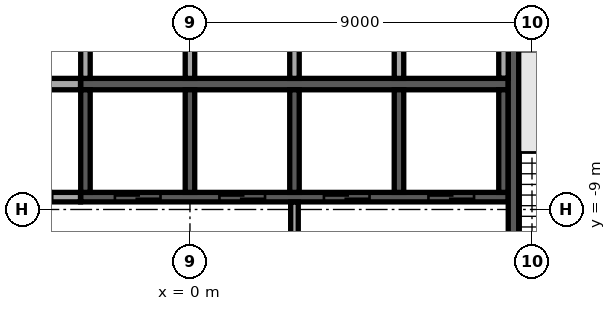
"""IFC4 building model, lengths in metres.
Left out: names, types, materials, properties, quantities, classifications, styles, units other than length and angle.
Written with IfcOpenShell. Run it as: python <this file> out.ifc"""

import sys

from ifc_helpers import new_model, si_unit, direction, frame, frame_2d, origin, place, context, subcontext, project, spatial, rectangle, extrude, element, fill, save


model = new_model("IFC4")
c1 = context("Model", 3, precision=1e-05, world=origin(), true_north=direction((0.0, 1.0)))
c2 = subcontext(c1, "Body", "Model", "MODEL_VIEW")
j1 = project(units=[si_unit("LENGTHUNIT", "METRE"), si_unit("PLANEANGLEUNIT", "RADIAN")], contexts=[c1])
p1 = place(None, origin())
s1 = spatial("IfcSite", under=j1, at=p1, CompositionType="ELEMENT")
p2 = place(p1, origin())
s2 = spatial("IfcBuilding", under=s1, at=p2, CompositionType="ELEMENT")
p3 = place(p2, frame((0.0, 0.0, 225.3)))
s3 = spatial("IfcBuildingStorey", under=s2, at=p3, CompositionType="ELEMENT", Elevation=225.3)
p4 = place(p3, frame((-2.875, -5.7, 0.0), z_axis=(0.0, 0.0, 1.0), x_axis=(1.0, 0.0, 0.0)))
e1 = element("IfcWall", 1, at=p4, inside=s3, PredefinedType="SOLIDWALL", context=c2, shape_type="SweptSolid", body=[
    extrude(rectangle(XDim=11.25, YDim=0.3, at=frame_2d((5.625, 0.0))), origin(), (0.0, 0.0, 1.0), 3.62),
])
for number, where, z_axis, x_axis in (
    (2, (-2.75, -5.55, 0.0), (0.0, 0.0, 1.0), (0.0, 1.0, 0.0)),
    (3, (0.0, -5.55, 0.0), (0.0, 0.0, 1.0), (0.0, 1.0, 0.0)),
    (4, (2.75, -5.55, 0.0), (0.0, 0.0, 1.0), (0.0, 1.0, 0.0)),
    (5, (5.5, -5.55, 0.0), (0.0, 0.0, 1.0), (0.0, 1.0, 0.0)),
):
    element("IfcWall", number, at=place(p3, frame(where, z_axis=z_axis, x_axis=x_axis)), inside=s3, PredefinedType="SOLIDWALL", context=c2, shape_type="SweptSolid", body=[
        extrude(rectangle(XDim=2.7, YDim=0.25, at=frame_2d((1.35, 0.0))), origin(), (0.0, 0.0, 1.0), 3.62),
    ])
p5 = place(p3, frame((-2.875, -8.675, 0.0), z_axis=(0.0, 0.0, 1.0), x_axis=(1.0, 0.0, 0.0)))
e6 = element("IfcWall", 6, at=p5, inside=s3, PredefinedType="SOLIDWALL", context=c2, shape_type="SweptSolid", body=[
    extrude(rectangle(XDim=11.25, YDim=0.25, at=frame_2d((5.625, 0.0))), origin(), (0.0, 0.0, 1.0), 3.62),
])
p6 = place(p5, frame((0.9, 0.0, 0.0)))
e7 = element("IfcOpeningElement", 7, at=p6, cuts=e6, PredefinedType="OPENING", context=c2, shape_type="SweptSolid", body=[
    extrude(rectangle(XDim=1.2, YDim=2.1, at=frame_2d((0.6, 1.05))), frame((0.0, 0.135, 0.0), z_axis=(0.0, -1.0, 0.0), x_axis=(1.0, 0.0, 0.0)), (0.0, 0.0, 1.0), 0.27),
])
p7 = place(p5, frame((3.65, 0.0, 0.0)))
e8 = element("IfcOpeningElement", 8, at=p7, cuts=e6, PredefinedType="OPENING", context=c2, shape_type="SweptSolid", body=[
    extrude(rectangle(XDim=1.2, YDim=2.1, at=frame_2d((0.6, 1.05))), frame((0.0, 0.135, 0.0), z_axis=(0.0, -1.0, 0.0), x_axis=(1.0, 0.0, 0.0)), (0.0, 0.0, 1.0), 0.27),
])
p8 = place(p5, frame((6.4, 0.0, 0.0)))
e9 = element("IfcOpeningElement", 9, at=p8, cuts=e6, PredefinedType="OPENING", context=c2, shape_type="SweptSolid", body=[
    extrude(rectangle(XDim=1.2, YDim=2.1, at=frame_2d((0.6, 1.05))), frame((0.0, 0.135, 0.0), z_axis=(0.0, -1.0, 0.0), x_axis=(1.0, 0.0, 0.0)), (0.0, 0.0, 1.0), 0.27),
])
p9 = place(p5, frame((9.15, 0.0, 0.0)))
e10 = element("IfcOpeningElement", 10, at=p9, cuts=e6, PredefinedType="OPENING", context=c2, shape_type="SweptSolid", body=[
    extrude(rectangle(XDim=1.2, YDim=2.1, at=frame_2d((0.6, 1.05))), frame((0.0, 0.135, 0.0), z_axis=(0.0, -1.0, 0.0), x_axis=(1.0, 0.0, 0.0)), (0.0, 0.0, 1.0), 0.27),
])
for number, where, z_axis, x_axis in (
    (11, (-2.75, -8.55, 0.0), (0.0, 0.0, 1.0), (0.0, 1.0, 0.0)),
    (12, (0.0, -8.55, 0.0), (0.0, 0.0, 1.0), (0.0, 1.0, 0.0)),
    (13, (2.75, -8.55, 0.0), (0.0, 0.0, 1.0), (0.0, 1.0, 0.0)),
    (14, (5.5, -8.55, 0.0), (0.0, 0.0, 1.0), (0.0, 1.0, 0.0)),
    (15, (8.25, -8.55, 0.0), (0.0, 0.0, 1.0), (0.0, 1.0, 0.0)),
):
    element("IfcWall", number, at=place(p3, frame(where, z_axis=z_axis, x_axis=x_axis)), inside=s3, PredefinedType="SOLIDWALL", context=c2, shape_type="SweptSolid", body=[
        extrude(rectangle(XDim=2.7, YDim=0.25, at=frame_2d((1.35, 0.0))), origin(), (0.0, 0.0, 1.0), 3.62),
    ])
p10 = place(p3, frame((8.512, -4.55, 0.0), z_axis=(0.0, 0.0, 1.0), x_axis=(0.0, -1.0, 0.0)))
e16 = element("IfcWall", 16, at=p10, inside=s3, PredefinedType="SOLIDWALL", context=c2, shape_type="SweptSolid", body=[
    extrude(rectangle(XDim=7.25, YDim=0.275, at=frame_2d((3.625, 0.0))), origin(), (0.0, 0.0, 1.0), 3.62),
])
p11 = place(p10, frame((6.0, 0.0, 0.0)))
e17 = element("IfcOpeningElement", 17, at=p11, cuts=e16, PredefinedType="OPENING", context=c2, shape_type="SweptSolid", body=[
    extrude(rectangle(XDim=1.0, YDim=2.1, at=frame_2d((0.5, 1.05))), frame((0.0, 0.147, 0.0), z_axis=(0.0, -1.0, 0.0), x_axis=(1.0, 0.0, 0.0)), (0.0, 0.0, 1.0), 0.295),
])
p12 = place(p3, frame((2.75, -11.795, 0.0), z_axis=(0.0, 0.0, 1.0), x_axis=(0.0, 1.0, 0.0)))
e18 = element("IfcWall", 18, at=p12, inside=s3, PredefinedType="PARTITIONING", context=c2, shape_type="SweptSolid", body=[
    extrude(rectangle(XDim=2.99, YDim=0.2, at=frame_2d((1.495, 0.0))), origin(), (0.0, 0.0, 1.0), 3.62),
])
p13 = place(p3, frame((-8.37, -8.675, 0.0), z_axis=(0.0, 0.0, 1.0), x_axis=(1.0, 0.0, 0.0)))
e19 = element("IfcWall", 19, at=p13, inside=s3, PredefinedType="PARTITIONING", context=c2, shape_type="SweptSolid", body=[
    extrude(rectangle(XDim=5.49, YDim=0.25, at=frame_2d((2.745, 0.0))), origin(), (0.0, 0.0, 1.0), 3.62),
])
p14 = place(p13, frame((0.995, 0.0, 0.0)))
e20 = element("IfcOpeningElement", 20, at=p14, cuts=e19, PredefinedType="OPENING", context=c2, shape_type="SweptSolid", body=[
    extrude(rectangle(XDim=1.0, YDim=2.1, at=frame_2d((0.5, 1.05))), frame((0.0, 0.135, 0.0), z_axis=(0.0, -1.0, 0.0), x_axis=(1.0, 0.0, 0.0)), (0.0, 0.0, 1.0), 0.27),
])
p15 = place(p13, frame((3.745, 0.0, 0.0)))
e21 = element("IfcOpeningElement", 21, at=p15, cuts=e19, PredefinedType="OPENING", context=c2, shape_type="SweptSolid", body=[
    extrude(rectangle(XDim=1.0, YDim=2.1, at=frame_2d((0.5, 1.05))), frame((0.0, 0.135, 0.0), z_axis=(0.0, -1.0, 0.0), x_axis=(1.0, 0.0, 0.0)), (0.0, 0.0, 1.0), 0.27),
])
p16 = place(p3, frame((-8.35, -5.7, 0.0), z_axis=(0.0, 0.0, 1.0), x_axis=(1.0, 0.0, 0.0)))
e22 = element("IfcWall", 22, at=p16, inside=s3, PredefinedType="PARTITIONING", context=c2, shape_type="SweptSolid", body=[
    extrude(rectangle(XDim=5.47, YDim=0.3, at=frame_2d((2.735, 0.0))), origin(), (0.0, 0.0, 1.0), 3.62),
])
p17 = place(p3, frame((8.25, -5.545, 0.0), z_axis=(0.0, 0.0, 1.0), x_axis=(0.0, 1.0, 0.0)))
e23 = element("IfcWall", 23, at=p17, inside=s3, PredefinedType="PARTITIONING", context=c2, shape_type="SweptSolid", body=[
    extrude(rectangle(XDim=2.69, YDim=0.25, at=frame_2d((1.345, 0.0))), origin(), (0.0, 0.0, 1.0), 3.62),
])
p18 = place(p3, frame((3.777, -34.584, 0.0), z_axis=(0.0, 0.0, 1.0), x_axis=(0.629323778295, 0.777143218508, 0.0)))
e24 = element("IfcWall", 24, at=p18, inside=s3, PredefinedType="STANDARD", context=c2, shape_type="SweptSolid", body=[
    extrude(rectangle(XDim=49.0, YDim=0.6, at=frame_2d((24.5, 0.0))), origin(), (0.0, 0.0, 1.0), 3.62),
])
p19 = place(p18, frame((1.227, 0.0, 0.9)))
e25 = element("IfcOpeningElement", 25, at=p19, cuts=e24, PredefinedType="OPENING", context=c2, shape_type="SweptSolid", body=[
    extrude(rectangle(XDim=2.0, YDim=2.1, at=frame_2d((1.0, 1.05))), frame((0.0, 0.31, 0.0), z_axis=(0.0, -1.0, 0.0), x_axis=(1.0, 0.0, 0.0)), (0.0, 0.0, 1.0), 0.62),
])
p20 = place(p18, frame((5.682, 0.0, 0.9)))
e26 = element("IfcOpeningElement", 26, at=p20, cuts=e24, PredefinedType="OPENING", context=c2, shape_type="SweptSolid", body=[
    extrude(rectangle(XDim=2.0, YDim=2.1, at=frame_2d((1.0, 1.05))), frame((0.0, 0.31, 0.0), z_axis=(0.0, -1.0, 0.0), x_axis=(1.0, 0.0, 0.0)), (0.0, 0.0, 1.0), 0.62),
])
p21 = place(p18, frame((10.136, 0.0, 0.9)))
e27 = element("IfcOpeningElement", 27, at=p21, cuts=e24, PredefinedType="OPENING", context=c2, shape_type="SweptSolid", body=[
    extrude(rectangle(XDim=2.0, YDim=2.1, at=frame_2d((1.0, 1.05))), frame((0.0, 0.31, 0.0), z_axis=(0.0, -1.0, 0.0), x_axis=(1.0, 0.0, 0.0)), (0.0, 0.0, 1.0), 0.62),
])
p22 = place(p18, frame((14.591, 0.0, 0.9)))
e28 = element("IfcOpeningElement", 28, at=p22, cuts=e24, PredefinedType="OPENING", context=c2, shape_type="SweptSolid", body=[
    extrude(rectangle(XDim=2.0, YDim=2.1, at=frame_2d((1.0, 1.05))), frame((0.0, 0.31, 0.0), z_axis=(0.0, -1.0, 0.0), x_axis=(1.0, 0.0, 0.0)), (0.0, 0.0, 1.0), 0.62),
])
p23 = place(p18, frame((19.045, 0.0, 0.9)))
e29 = element("IfcOpeningElement", 29, at=p23, cuts=e24, PredefinedType="OPENING", context=c2, shape_type="SweptSolid", body=[
    extrude(rectangle(XDim=2.0, YDim=2.1, at=frame_2d((1.0, 1.05))), frame((0.0, 0.31, 0.0), z_axis=(0.0, -1.0, 0.0), x_axis=(1.0, 0.0, 0.0)), (0.0, 0.0, 1.0), 0.62),
])
p24 = place(p18, frame((23.5, 0.0, 0.9)))
e30 = element("IfcOpeningElement", 30, at=p24, cuts=e24, PredefinedType="OPENING", context=c2, shape_type="SweptSolid", body=[
    extrude(rectangle(XDim=2.0, YDim=2.1, at=frame_2d((1.0, 1.05))), frame((0.0, 0.31, 0.0), z_axis=(0.0, -1.0, 0.0), x_axis=(1.0, 0.0, 0.0)), (0.0, 0.0, 1.0), 0.62),
])
p25 = place(p18, frame((27.955, 0.0, 0.9)))
e31 = element("IfcOpeningElement", 31, at=p25, cuts=e24, PredefinedType="OPENING", context=c2, shape_type="SweptSolid", body=[
    extrude(rectangle(XDim=2.0, YDim=2.1, at=frame_2d((1.0, 1.05))), frame((0.0, 0.31, 0.0), z_axis=(0.0, -1.0, 0.0), x_axis=(1.0, 0.0, 0.0)), (0.0, 0.0, 1.0), 0.62),
])
p26 = place(p18, frame((32.409, 0.0, 0.9)))
e32 = element("IfcOpeningElement", 32, at=p26, cuts=e24, PredefinedType="OPENING", context=c2, shape_type="SweptSolid", body=[
    extrude(rectangle(XDim=2.0, YDim=2.1, at=frame_2d((1.0, 1.05))), frame((0.0, 0.31, 0.0), z_axis=(0.0, -1.0, 0.0), x_axis=(1.0, 0.0, 0.0)), (0.0, 0.0, 1.0), 0.62),
])
p27 = place(p18, frame((36.864, 0.0, 0.9)))
e33 = element("IfcOpeningElement", 33, at=p27, cuts=e24, PredefinedType="OPENING", context=c2, shape_type="SweptSolid", body=[
    extrude(rectangle(XDim=2.0, YDim=2.1, at=frame_2d((1.0, 1.05))), frame((0.0, 0.31, 0.0), z_axis=(0.0, -1.0, 0.0), x_axis=(1.0, 0.0, 0.0)), (0.0, 0.0, 1.0), 0.62),
])
p28 = place(p18, frame((41.318, 0.0, 0.9)))
e34 = element("IfcOpeningElement", 34, at=p28, cuts=e24, PredefinedType="OPENING", context=c2, shape_type="SweptSolid", body=[
    extrude(rectangle(XDim=2.0, YDim=2.1, at=frame_2d((1.0, 1.05))), frame((0.0, 0.31, 0.0), z_axis=(0.0, -1.0, 0.0), x_axis=(1.0, 0.0, 0.0)), (0.0, 0.0, 1.0), 0.62),
])
p29 = place(p18, frame((45.773, 0.0, 0.9)))
e35 = element("IfcOpeningElement", 35, at=p29, cuts=e24, PredefinedType="OPENING", context=c2, shape_type="SweptSolid", body=[
    extrude(rectangle(XDim=2.0, YDim=2.1, at=frame_2d((1.0, 1.05))), frame((0.0, 0.31, 0.0), z_axis=(0.0, -1.0, 0.0), x_axis=(1.0, 0.0, 0.0)), (0.0, 0.0, 1.0), 0.62),
])
p30 = place(p3, frame((-24.374, -8.878, 0.0), z_axis=(0.0, 0.0, 1.0), x_axis=(0.777132572121, -0.629336925143, 0.0)))
e36 = element("IfcWall", 36, at=p30, inside=s3, PredefinedType="PARTITIONING", context=c2, shape_type="SweptSolid", body=[
    extrude(rectangle(XDim=26.785, YDim=0.15, at=frame_2d((13.393, 0.0))), origin(), (0.0, 0.0, 1.0), 3.17),
])
p31 = place(p30, frame((1.3, 0.0, 0.0)))
e37 = element("IfcOpeningElement", 37, at=p31, cuts=e36, PredefinedType="OPENING", context=c2, shape_type="SweptSolid", body=[
    extrude(rectangle(XDim=1.0, YDim=2.1, at=frame_2d((0.5, 1.05))), frame((0.0, 0.085, 0.0), z_axis=(0.0, -1.0, 0.0), x_axis=(1.0, 0.0, 0.0)), (0.0, 0.0, 1.0), 0.17),
])
p32 = place(p30, frame((5.461, 0.0, 0.0)))
e38 = element("IfcOpeningElement", 38, at=p32, cuts=e36, PredefinedType="OPENING", context=c2, shape_type="SweptSolid", body=[
    extrude(rectangle(XDim=1.0, YDim=2.1, at=frame_2d((0.5, 1.05))), frame((0.0, 0.085, 0.0), z_axis=(0.0, -1.0, 0.0), x_axis=(1.0, 0.0, 0.0)), (0.0, 0.0, 1.0), 0.17),
])
p33 = place(p30, frame((11.587, 0.0, 0.0)))
e39 = element("IfcOpeningElement", 39, at=p33, cuts=e36, PredefinedType="OPENING", context=c2, shape_type="SweptSolid", body=[
    extrude(rectangle(XDim=1.0, YDim=2.1, at=frame_2d((0.5, 1.05))), frame((0.0, 0.085, 0.0), z_axis=(0.0, -1.0, 0.0), x_axis=(1.0, 0.0, 0.0)), (0.0, 0.0, 1.0), 0.17),
])
p34 = place(p3, frame((3.18, -26.643, 0.0), z_axis=(0.0, 0.0, 1.0), x_axis=(0.629322822444, 0.777143992547, 0.0)))
e40 = element("IfcWall", 40, at=p34, inside=s3, PredefinedType="PARTITIONING", context=c2, shape_type="SweptSolid", body=[
    extrude(rectangle(XDim=37.483, YDim=0.15, at=frame_2d((18.741, 0.0))), origin(), (0.0, 0.0, 1.0), 3.17),
])
p35 = place(p34, frame((6.346, 0.0, 0.0)))
e41 = element("IfcOpeningElement", 41, at=p35, cuts=e40, PredefinedType="OPENING", context=c2, shape_type="SweptSolid", body=[
    extrude(rectangle(XDim=1.0, YDim=2.1, at=frame_2d((0.5, 1.05))), frame((0.0, 0.085, 0.0), z_axis=(0.0, -1.0, 0.0), x_axis=(1.0, 0.0, 0.0)), (0.0, 0.0, 1.0), 0.17),
])
p36 = place(p34, frame((16.452, 0.0, 0.0)))
e42 = element("IfcOpeningElement", 42, at=p36, cuts=e40, PredefinedType="OPENING", context=c2, shape_type="SweptSolid", body=[
    extrude(rectangle(XDim=1.0, YDim=2.1, at=frame_2d((0.5, 1.05))), frame((0.0, 0.085, 0.0), z_axis=(0.0, -1.0, 0.0), x_axis=(1.0, 0.0, 0.0)), (0.0, 0.0, 1.0), 0.17),
])
p37 = place(p34, frame((23.4, 0.0, 0.0)))
e43 = element("IfcOpeningElement", 43, at=p37, cuts=e40, PredefinedType="OPENING", context=c2, shape_type="SweptSolid", body=[
    extrude(rectangle(XDim=1.0, YDim=2.1, at=frame_2d((0.5, 1.05))), frame((0.0, 0.085, 0.0), z_axis=(0.0, -1.0, 0.0), x_axis=(1.0, 0.0, 0.0)), (0.0, 0.0, 1.0), 0.17),
])
p38 = place(p6, origin())
e44 = element("IfcDoor", 44, at=p38, inside=s3, OperationType="DOUBLE_DOOR_SLIDING", PredefinedType="DOOR", context=c2, shape_type="SweptSolid", body=[
    extrude(rectangle(XDim=1.2, YDim=2.1, at=frame_2d((0.6, 1.05))), frame((0.0, 0.025, 0.0), z_axis=(0.0, -1.0, 0.0), x_axis=(1.0, 0.0, 0.0)), (0.0, 0.0, 1.0), 0.05),
])
fill(e7, e44)
p39 = place(p7, origin())
e45 = element("IfcDoor", 45, at=p39, inside=s3, OperationType="DOUBLE_DOOR_SLIDING", PredefinedType="DOOR", context=c2, shape_type="SweptSolid", body=[
    extrude(rectangle(XDim=1.2, YDim=2.1, at=frame_2d((0.6, 1.05))), frame((0.0, 0.025, 0.0), z_axis=(0.0, -1.0, 0.0), x_axis=(1.0, 0.0, 0.0)), (0.0, 0.0, 1.0), 0.05),
])
fill(e8, e45)
p40 = place(p8, origin())
e46 = element("IfcDoor", 46, at=p40, inside=s3, OperationType="DOUBLE_DOOR_SLIDING", PredefinedType="DOOR", context=c2, shape_type="SweptSolid", body=[
    extrude(rectangle(XDim=1.2, YDim=2.1, at=frame_2d((0.6, 1.05))), frame((0.0, 0.025, 0.0), z_axis=(0.0, -1.0, 0.0), x_axis=(1.0, 0.0, 0.0)), (0.0, 0.0, 1.0), 0.05),
])
fill(e9, e46)
p41 = place(p9, origin())
e47 = element("IfcDoor", 47, at=p41, inside=s3, OperationType="DOUBLE_DOOR_SLIDING", PredefinedType="DOOR", context=c2, shape_type="SweptSolid", body=[
    extrude(rectangle(XDim=1.2, YDim=2.1, at=frame_2d((0.6, 1.05))), frame((0.0, 0.025, 0.0), z_axis=(0.0, -1.0, 0.0), x_axis=(1.0, 0.0, 0.0)), (0.0, 0.0, 1.0), 0.05),
])
fill(e10, e47)
save(model, sys.argv[1])
